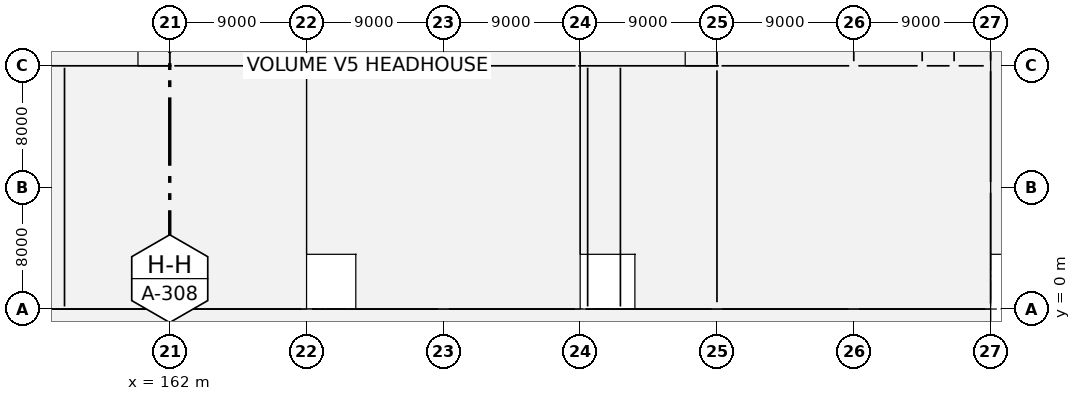
"""IFC4 building model, lengths in metres.
Left out: names, types, materials, properties, quantities, classifications, styles, units other than length and angle.
Written with IfcOpenShell. Run it as: python <this file> out.ifc"""

import sys

from ifc_helpers import new_model, si_unit, direction, frame, frame_2d, origin, origin_2d, place, context, subcontext, project, spatial, rectangle, extrude, element, fill, save


model = new_model("IFC4")
c1 = context("Model", 3, precision=1e-05, world=origin(), true_north=direction((0.0, 1.0)))
c2 = subcontext(c1, "Body", "Model", "MODEL_VIEW")
j1 = project(units=[si_unit("LENGTHUNIT", "METRE"), si_unit("PLANEANGLEUNIT", "RADIAN")], contexts=[c1])
p1 = place(None, origin())
s1 = spatial("IfcSite", under=j1, at=p1, CompositionType="ELEMENT")
p2 = place(p1, origin())
s2 = spatial("IfcBuilding", under=s1, at=p2, CompositionType="ELEMENT")
p3 = place(p2, origin())
s3 = spatial("IfcBuildingStorey", under=s2, at=p3, CompositionType="ELEMENT", Elevation=0.0)
for number, where, z_axis, x_axis in (
    (1, (162.0, 0.0, -0.5), (0.0, 0.0, 1.0), (1.0, 0.0, 0.0)),
    (2, (162.0, 8.0, -0.5), (0.0, 0.0, 1.0), (1.0, 0.0, 0.0)),
    (3, (162.0, 16.0, -0.5), (0.0, 0.0, 1.0), (1.0, 0.0, 0.0)),
    (4, (171.0, 0.0, -0.5), (0.0, 0.0, 1.0), (1.0, 0.0, 0.0)),
    (5, (171.0, 8.0, -0.5), (0.0, 0.0, 1.0), (1.0, 0.0, 0.0)),
    (6, (171.0, 16.0, -0.5), (0.0, 0.0, 1.0), (1.0, 0.0, 0.0)),
    (7, (180.0, 0.0, -0.5), (0.0, 0.0, 1.0), (1.0, 0.0, 0.0)),
    (8, (180.0, 16.0, -0.5), (0.0, 0.0, 1.0), (1.0, 0.0, 0.0)),
    (9, (189.0, 0.0, -0.5), (0.0, 0.0, 1.0), (1.0, 0.0, 0.0)),
    (10, (189.0, 8.0, -0.5), (0.0, 0.0, 1.0), (1.0, 0.0, 0.0)),
    (11, (189.0, 16.0, -0.5), (0.0, 0.0, 1.0), (1.0, 0.0, 0.0)),
    (12, (198.0, 0.0, -0.5), (0.0, 0.0, 1.0), (1.0, 0.0, 0.0)),
    (13, (198.0, 8.0, -0.5), (0.0, 0.0, 1.0), (1.0, 0.0, 0.0)),
    (14, (198.0, 16.0, -0.5), (0.0, 0.0, 1.0), (1.0, 0.0, 0.0)),
    (15, (207.0, 0.0, -0.5), (0.0, 0.0, 1.0), (1.0, 0.0, 0.0)),
    (16, (207.0, 8.0, -0.5), (0.0, 0.0, 1.0), (1.0, 0.0, 0.0)),
    (17, (207.0, 16.0, -0.5), (0.0, 0.0, 1.0), (1.0, 0.0, 0.0)),
    (18, (216.0, 0.0, -0.5), (0.0, 0.0, 1.0), (1.0, 0.0, 0.0)),
    (19, (216.0, 8.0, -0.5), (0.0, 0.0, 1.0), (1.0, 0.0, 0.0)),
    (20, (216.0, 16.0, -0.5), (0.0, 0.0, 1.0), (1.0, 0.0, 0.0)),
):
    element("IfcColumn", number, at=place(p3, frame(where, z_axis=z_axis, x_axis=x_axis)), inside=s3, PredefinedType="COLUMN", context=c2, shape_type="SweptSolid", body=[
        extrude(rectangle(XDim=0.7, YDim=0.7, at=origin_2d()), origin(), (0.0, 0.0, 1.0), 6.8),
    ])
p4 = place(p3, frame((154.8, 0.0, 0.0), z_axis=(0.0, 0.0, 1.0), x_axis=(-1.0, 0.0, 0.0)))
e21 = element("IfcWall", 21, at=p4, inside=s3, PredefinedType="SOLIDWALL", context=c2, shape_type="SweptSolid", body=[
    extrude(rectangle(XDim=1.45, YDim=0.34, at=frame_2d((0.725, 0.0))), origin(), (0.0, 0.0, 1.0), 5.1),
])
p5 = place(p4, frame((0.1, 0.0, 0.0)))
e22 = element("IfcOpeningElement", 22, at=p5, cuts=e21, PredefinedType="OPENING", context=c2, shape_type="SweptSolid", body=[
    extrude(rectangle(XDim=1.2, YDim=2.25, at=frame_2d((0.6, 1.125))), frame((0.0, 0.18, 0.0), z_axis=(0.0, -1.0, 0.0), x_axis=(1.0, 0.0, 0.0)), (0.0, 0.0, 1.0), 0.36),
])
p6 = place(p3, frame((162.35, 0.0, 0.0), z_axis=(0.0, 0.0, 1.0), x_axis=(1.0, 0.0, 0.0)))
e23 = element("IfcWall", 23, at=p6, inside=s3, PredefinedType="SOLIDWALL", context=c2, shape_type="SweptSolid", body=[
    extrude(rectangle(XDim=8.3, YDim=0.3, at=frame_2d((4.15, 0.0))), origin(), (0.0, 0.0, 1.0), 0.45),
])
p7 = place(p3, frame((171.35, 0.0, 0.0), z_axis=(0.0, 0.0, 1.0), x_axis=(1.0, 0.0, 0.0)))
e24 = element("IfcWall", 24, at=p7, inside=s3, PredefinedType="SOLIDWALL", context=c2, shape_type="SweptSolid", body=[
    extrude(rectangle(XDim=8.3, YDim=0.34, at=frame_2d((4.15, 0.0))), origin(), (0.0, 0.0, 1.0), 5.1),
])
p8 = place(p7, frame((2.95, 0.0, 0.0)))
e25 = element("IfcOpeningElement", 25, at=p8, cuts=e24, PredefinedType="OPENING", context=c2, shape_type="SweptSolid", body=[
    extrude(rectangle(XDim=2.4, YDim=3.1, at=frame_2d((1.2, 1.55))), frame((0.0, 0.18, 0.0), z_axis=(0.0, -1.0, 0.0), x_axis=(1.0, 0.0, 0.0)), (0.0, 0.0, 1.0), 0.36),
])
p9 = place(p3, frame((180.35, 0.0, 0.0), z_axis=(0.0, 0.0, 1.0), x_axis=(1.0, 0.0, 0.0)))
e26 = element("IfcWall", 26, at=p9, inside=s3, PredefinedType="SOLIDWALL", context=c2, shape_type="SweptSolid", body=[
    extrude(rectangle(XDim=8.3, YDim=0.3, at=frame_2d((4.15, 0.0))), origin(), (0.0, 0.0, 1.0), 0.45),
])
p10 = place(p3, frame((191.0, 0.0, 0.0), z_axis=(0.0, 0.0, 1.0), x_axis=(-1.0, 0.0, 0.0)))
e27 = element("IfcWall", 27, at=p10, inside=s3, PredefinedType="SOLIDWALL", context=c2, shape_type="SweptSolid", body=[
    extrude(rectangle(XDim=1.65, YDim=0.34, at=frame_2d((0.825, 0.0))), origin(), (0.0, 0.0, 1.0), 5.1),
])
p11 = place(p10, frame((0.1, 0.0, 0.0)))
e28 = element("IfcOpeningElement", 28, at=p11, cuts=e27, PredefinedType="OPENING", context=c2, shape_type="SweptSolid", body=[
    extrude(rectangle(XDim=1.2, YDim=2.25, at=frame_2d((0.6, 1.125))), frame((0.0, 0.18, 0.0), z_axis=(0.0, -1.0, 0.0), x_axis=(1.0, 0.0, 0.0)), (0.0, 0.0, 1.0), 0.36),
])
p12 = place(p3, frame((198.35, 0.0, 0.0), z_axis=(0.0, 0.0, 1.0), x_axis=(1.0, 0.0, 0.0)))
e29 = element("IfcWall", 29, at=p12, inside=s3, PredefinedType="SOLIDWALL", context=c2, shape_type="SweptSolid", body=[
    extrude(rectangle(XDim=8.3, YDim=0.3, at=frame_2d((4.15, 0.0))), origin(), (0.0, 0.0, 1.0), 0.45),
])
p13 = place(p3, frame((207.35, 0.0, 0.0), z_axis=(0.0, 0.0, 1.0), x_axis=(1.0, 0.0, 0.0)))
e30 = element("IfcWall", 30, at=p13, inside=s3, PredefinedType="SOLIDWALL", context=c2, shape_type="SweptSolid", body=[
    extrude(rectangle(XDim=8.3, YDim=0.34, at=frame_2d((4.15, 0.0))), origin(), (0.0, 0.0, 1.0), 5.1),
])
p14 = place(p13, frame((2.95, 0.0, 0.0)))
e31 = element("IfcOpeningElement", 31, at=p14, cuts=e30, PredefinedType="OPENING", context=c2, shape_type="SweptSolid", body=[
    extrude(rectangle(XDim=2.4, YDim=3.1, at=frame_2d((1.2, 1.55))), frame((0.0, 0.18, 0.0), z_axis=(0.0, -1.0, 0.0), x_axis=(1.0, 0.0, 0.0)), (0.0, 0.0, 1.0), 0.36),
])
p15 = place(p3, frame((216.0, 0.35, 0.0), z_axis=(0.0, 0.0, 1.0), x_axis=(0.0, 1.0, 0.0)))
e32 = element("IfcWall", 32, at=p15, inside=s3, PredefinedType="SOLIDWALL", context=c2, shape_type="SweptSolid", body=[
    extrude(rectangle(XDim=7.3, YDim=0.34, at=frame_2d((3.65, 0.0))), origin(), (0.0, 0.0, 1.0), 5.1),
])
p16 = place(p15, frame((2.45, 0.0, 0.0)))
e33 = element("IfcOpeningElement", 33, at=p16, cuts=e32, PredefinedType="OPENING", context=c2, shape_type="SweptSolid", body=[
    extrude(rectangle(XDim=2.4, YDim=3.1, at=frame_2d((1.2, 1.55))), frame((0.0, 0.18, 0.0), z_axis=(0.0, -1.0, 0.0), x_axis=(1.0, 0.0, 0.0)), (0.0, 0.0, 1.0), 0.36),
])
p17 = place(p3, frame((216.0, 8.35, 0.0), z_axis=(0.0, 0.0, 1.0), x_axis=(0.0, 1.0, 0.0)))
e34 = element("IfcWall", 34, at=p17, inside=s3, PredefinedType="SOLIDWALL", context=c2, shape_type="SweptSolid", body=[
    extrude(rectangle(XDim=7.3, YDim=0.34, at=frame_2d((3.65, 0.0))), origin(), (0.0, 0.0, 1.0), 5.1),
])
p18 = place(p17, frame((1.433, 0.0, 0.85)))
e35 = element("IfcOpeningElement", 35, at=p18, cuts=e34, PredefinedType="OPENING", context=c2, shape_type="SweptSolid", body=[
    extrude(rectangle(XDim=2.0, YDim=3.3, at=frame_2d((1.0, 1.65))), frame((0.0, 0.18, 0.0), z_axis=(0.0, -1.0, 0.0), x_axis=(1.0, 0.0, 0.0)), (0.0, 0.0, 1.0), 0.36),
])
p19 = place(p17, frame((3.867, 0.0, 0.85)))
e36 = element("IfcOpeningElement", 36, at=p19, cuts=e34, PredefinedType="OPENING", context=c2, shape_type="SweptSolid", body=[
    extrude(rectangle(XDim=2.0, YDim=3.3, at=frame_2d((1.0, 1.65))), frame((0.0, 0.18, 0.0), z_axis=(0.0, -1.0, 0.0), x_axis=(1.0, 0.0, 0.0)), (0.0, 0.0, 1.0), 0.36),
])
p20 = place(p3, frame((216.0, 16.35, 0.0), z_axis=(0.0, 0.0, 1.0), x_axis=(0.0, 1.0, 0.0)))
e37 = element("IfcWall", 37, at=p20, inside=s3, PredefinedType="SOLIDWALL", context=c2, shape_type="SweptSolid", body=[
    extrude(rectangle(XDim=7.3, YDim=0.34, at=frame_2d((3.65, 0.0))), origin(), (0.0, 0.0, 1.0), 5.1),
])
p21 = place(p20, frame((2.45, 0.0, 0.0)))
e38 = element("IfcOpeningElement", 38, at=p21, cuts=e37, PredefinedType="OPENING", context=c2, shape_type="SweptSolid", body=[
    extrude(rectangle(XDim=2.4, YDim=3.1, at=frame_2d((1.2, 1.55))), frame((0.0, 0.18, 0.0), z_axis=(0.0, -1.0, 0.0), x_axis=(1.0, 0.0, 0.0)), (0.0, 0.0, 1.0), 0.36),
])
p22 = place(p3, frame((162.125, 16.0, -0.5), z_axis=(0.0, 0.0, 1.0), x_axis=(-1.0, 0.0, 0.0)))
e39 = element("IfcWall", 39, at=p22, inside=s3, PredefinedType="SOLIDWALL", context=c2, shape_type="SweptSolid", body=[
    extrude(rectangle(XDim=9.25, YDim=0.25, at=frame_2d((4.625, 0.0))), origin(), (0.0, 0.0, 1.0), 6.8),
])
p23 = place(p22, frame((7.425, 0.0, 0.5)))
e40 = element("IfcOpeningElement", 40, at=p23, cuts=e39, PredefinedType="OPENING", context=c2, shape_type="SweptSolid", body=[
    extrude(rectangle(XDim=1.2, YDim=2.2, at=frame_2d((0.6, 1.1))), frame((0.0, 0.135, 0.0), z_axis=(0.0, -1.0, 0.0), x_axis=(1.0, 0.0, 0.0)), (0.0, 0.0, 1.0), 0.27),
])
p24 = place(p3, frame((162.0, 16.125, -0.5), z_axis=(0.0, 0.0, 1.0), x_axis=(0.0, 1.0, 0.0)))
e41 = element("IfcWall", 41, at=p24, inside=s3, PredefinedType="SOLIDWALL", context=c2, shape_type="SweptSolid", body=[
    extrude(rectangle(XDim=7.75, YDim=0.25, at=frame_2d((3.875, 0.0))), origin(), (0.0, 0.0, 1.0), 6.8),
])
p25 = place(p3, frame((198.125, 16.0, -0.5), z_axis=(0.0, 0.0, 1.0), x_axis=(-1.0, 0.0, 0.0)))
e42 = element("IfcWall", 42, at=p25, inside=s3, PredefinedType="SOLIDWALL", context=c2, shape_type="SweptSolid", body=[
    extrude(rectangle(XDim=9.25, YDim=0.25, at=frame_2d((4.625, 0.0))), origin(), (0.0, 0.0, 1.0), 6.8),
])
p26 = place(p25, frame((7.225, 0.0, 0.5)))
e43 = element("IfcOpeningElement", 43, at=p26, cuts=e42, PredefinedType="OPENING", context=c2, shape_type="SweptSolid", body=[
    extrude(rectangle(XDim=1.2, YDim=2.2, at=frame_2d((0.6, 1.1))), frame((0.0, 0.135, 0.0), z_axis=(0.0, -1.0, 0.0), x_axis=(1.0, 0.0, 0.0)), (0.0, 0.0, 1.0), 0.27),
])
p27 = place(p3, frame((189.0, 16.125, -0.5), z_axis=(0.0, 0.0, 1.0), x_axis=(0.0, 1.0, 0.0)))
e44 = element("IfcWall", 44, at=p27, inside=s3, PredefinedType="SOLIDWALL", context=c2, shape_type="SweptSolid", body=[
    extrude(rectangle(XDim=7.75, YDim=0.25, at=frame_2d((3.875, 0.0))), origin(), (0.0, 0.0, 1.0), 6.8),
])
p28 = place(p27, frame((1.15, 0.0, 0.5)))
e45 = element("IfcOpeningElement", 45, at=p28, cuts=e44, PredefinedType="OPENING", context=c2, shape_type="SweptSolid", body=[
    extrude(rectangle(XDim=1.2, YDim=2.2, at=frame_2d((0.6, 1.1))), frame((0.0, 0.135, 0.0), z_axis=(0.0, -1.0, 0.0), x_axis=(1.0, 0.0, 0.0)), (0.0, 0.0, 1.0), 0.27),
])
p29 = place(p3, frame((198.0, 16.125, -0.5), z_axis=(0.0, 0.0, 1.0), x_axis=(0.0, 1.0, 0.0)))
e46 = element("IfcWall", 46, at=p29, inside=s3, PredefinedType="SOLIDWALL", context=c2, shape_type="SweptSolid", body=[
    extrude(rectangle(XDim=7.75, YDim=0.25, at=frame_2d((3.875, 0.0))), origin(), (0.0, 0.0, 1.0), 6.8),
])
p30 = place(p3, frame((198.0, 0.45, 0.0), z_axis=(0.0, 0.0, 1.0), x_axis=(0.0, 1.0, 0.0)))
e47 = element("IfcWall", 47, at=p30, inside=s3, PredefinedType="PARTITIONING", context=c2, shape_type="SweptSolid", body=[
    extrude(rectangle(XDim=15.25, YDim=0.11, at=frame_2d((7.625, 0.0))), origin(), (0.0, 0.0, 1.0), 5.35),
])
p31 = place(p30, frame((10.89, 0.0, 0.0)))
e48 = element("IfcOpeningElement", 48, at=p31, cuts=e47, PredefinedType="OPENING", context=c2, shape_type="SweptSolid", body=[
    extrude(rectangle(XDim=1.02, YDim=2.18, at=frame_2d((0.51, 1.09))), frame((0.0, 0.065, 0.0), z_axis=(0.0, -1.0, 0.0), x_axis=(1.0, 0.0, 0.0)), (0.0, 0.0, 1.0), 0.13),
])
p32 = place(p3, frame((162.3, 16.0, 0.0), z_axis=(0.0, 0.0, 1.0), x_axis=(1.0, 0.0, 0.0)))
e49 = element("IfcWall", 49, at=p32, inside=s3, PredefinedType="PARTITIONING", context=c2, shape_type="SweptSolid", body=[
    extrude(rectangle(XDim=26.4, YDim=0.14, at=frame_2d((13.2, 0.0))), origin(), (0.0, 0.0, 1.0), 5.25),
])
p33 = place(p32, frame((12.71, 0.0, 0.0)))
e50 = element("IfcOpeningElement", 50, at=p33, cuts=e49, PredefinedType="OPENING", context=c2, shape_type="SweptSolid", body=[
    extrude(rectangle(XDim=0.98, YDim=2.12, at=frame_2d((0.49, 1.06))), frame((0.0, 0.08, 0.0), z_axis=(0.0, -1.0, 0.0), x_axis=(1.0, 0.0, 0.0)), (0.0, 0.0, 1.0), 0.16),
])
p34 = place(p3, frame((198.3, 16.0, 0.0), z_axis=(0.0, 0.0, 1.0), x_axis=(1.0, 0.0, 0.0)))
e51 = element("IfcWall", 51, at=p34, inside=s3, PredefinedType="PARTITIONING", context=c2, shape_type="SweptSolid", body=[
    extrude(rectangle(XDim=8.4, YDim=0.135, at=frame_2d((4.2, 0.0))), origin(), (0.0, 0.0, 1.0), 5.25),
])
p35 = place(p3, frame((207.3, 16.0, 0.0), z_axis=(0.0, 0.0, 1.0), x_axis=(1.0, 0.0, 0.0)))
e52 = element("IfcWall", 52, at=p35, inside=s3, PredefinedType="PARTITIONING", context=c2, shape_type="SweptSolid", body=[
    extrude(rectangle(XDim=3.9, YDim=0.15, at=frame_2d((1.95, 0.0))), origin(), (0.0, 0.0, 1.0), 5.25),
])
p36 = place(p3, frame((211.8, 16.0, 0.0), z_axis=(0.0, 0.0, 1.0), x_axis=(1.0, 0.0, 0.0)))
e53 = element("IfcWall", 53, at=p36, inside=s3, PredefinedType="PARTITIONING", context=c2, shape_type="SweptSolid", body=[
    extrude(rectangle(XDim=1.5, YDim=0.135, at=frame_2d((0.75, 0.0))), origin(), (0.0, 0.0, 1.0), 5.25),
])
p37 = place(p3, frame((213.9, 16.0, 0.0), z_axis=(0.0, 0.0, 1.0), x_axis=(1.0, 0.0, 0.0)))
e54 = element("IfcWall", 54, at=p37, inside=s3, PredefinedType="PARTITIONING", context=c2, shape_type="SweptSolid", body=[
    extrude(rectangle(XDim=1.65, YDim=0.14, at=frame_2d((0.825, 0.0))), origin(), (0.0, 0.0, 1.0), 5.25),
])
p38 = place(p3, frame((207.0, 16.3, 0.0), z_axis=(0.0, 0.0, 1.0), x_axis=(0.0, 1.0, 0.0)))
e55 = element("IfcWall", 55, at=p38, inside=s3, PredefinedType="PARTITIONING", context=c2, shape_type="SweptSolid", body=[
    extrude(rectangle(XDim=7.4, YDim=0.15, at=frame_2d((3.7, 0.0))), origin(), (0.0, 0.0, 1.0), 5.35),
])
p39 = place(p3, frame((211.5, 16.3, 0.0), z_axis=(0.0, 0.0, 1.0), x_axis=(0.0, 1.0, 0.0)))
e56 = element("IfcWall", 56, at=p39, inside=s3, PredefinedType="PARTITIONING", context=c2, shape_type="SweptSolid", body=[
    extrude(rectangle(XDim=7.7, YDim=0.135, at=frame_2d((3.85, 0.0))), origin(), (0.0, 0.0, 1.0), 5.95),
])
p40 = place(p3, frame((213.6, 16.3, 0.0), z_axis=(0.0, 0.0, 1.0), x_axis=(0.0, 1.0, 0.0)))
e57 = element("IfcWall", 57, at=p40, inside=s3, PredefinedType="PARTITIONING", context=c2, shape_type="SweptSolid", body=[
    extrude(rectangle(XDim=7.7, YDim=0.15, at=frame_2d((3.85, 0.0))), origin(), (0.0, 0.0, 1.0), 5.95),
])
p41 = place(p3, frame((155.077, 0.17, 0.0), z_axis=(0.0, 0.0, 1.0), x_axis=(0.0, 1.0, 0.0)))
e58 = element("IfcWall", 58, at=p41, inside=s3, PredefinedType="STANDARD", context=c2, shape_type="SweptSolid", body=[
    extrude(rectangle(XDim=15.705, YDim=0.255, at=frame_2d((7.853, 0.0))), origin(), (0.0, 0.0, 1.0), 5.95),
])
p42 = place(p3, frame((154.8, 0.0, 0.0), z_axis=(0.0, 0.0, 1.0), x_axis=(1.0, 0.0, 0.0)))
e59 = element("IfcWall", 59, at=p42, inside=s3, PredefinedType="SOLIDWALL", context=c2, shape_type="SweptSolid", body=[
    extrude(rectangle(XDim=6.85, YDim=0.34, at=frame_2d((3.425, 0.0))), origin(), (0.0, 0.0, 1.0), 5.1),
])
p43 = place(p42, frame((1.5, 0.0, 0.0)))
e60 = element("IfcOpeningElement", 60, at=p43, cuts=e59, PredefinedType="OPENING", context=c2, shape_type="SweptSolid", body=[
    extrude(rectangle(XDim=2.4, YDim=3.1, at=frame_2d((1.2, 1.55))), frame((0.0, 0.18, 0.0), z_axis=(0.0, -1.0, 0.0), x_axis=(1.0, 0.0, 0.0)), (0.0, 0.0, 1.0), 0.36),
])
for number, where, z_axis, x_axis in (
    (61, (189.492, 0.17, 0.0), (0.0, 0.0, 1.0), (0.0, 1.0, 0.0)),
    (62, (191.647, 0.17, 0.0), (0.0, 0.0, 1.0), (0.0, 1.0, 0.0)),
):
    element("IfcWall", number, at=place(p3, frame(where, z_axis=z_axis, x_axis=x_axis)), inside=s3, PredefinedType="STANDARD", context=c2, shape_type="SweptSolid", body=[
        extrude(rectangle(XDim=15.705, YDim=0.255, at=frame_2d((7.853, 0.0))), origin(), (0.0, 0.0, 1.0), 5.95),
    ])
p44 = place(p3, frame((191.0, 0.0, 0.0), z_axis=(0.0, 0.0, 1.0), x_axis=(1.0, 0.0, 0.0)))
e63 = element("IfcWall", 63, at=p44, inside=s3, PredefinedType="SOLIDWALL", context=c2, shape_type="SweptSolid", body=[
    extrude(rectangle(XDim=6.65, YDim=0.34, at=frame_2d((3.325, 0.0))), origin(), (0.0, 0.0, 1.0), 5.1),
])
p45 = place(p44, frame((1.3, 0.0, 0.0)))
e64 = element("IfcOpeningElement", 64, at=p45, cuts=e63, PredefinedType="OPENING", context=c2, shape_type="SweptSolid", body=[
    extrude(rectangle(XDim=2.4, YDim=3.1, at=frame_2d((1.2, 1.55))), frame((0.0, 0.18, 0.0), z_axis=(0.0, -1.0, 0.0), x_axis=(1.0, 0.0, 0.0)), (0.0, 0.0, 1.0), 0.36),
])
p46 = place(p43, origin())
e65 = element("IfcDoor", 65, at=p46, inside=s3, OperationType="DOUBLE_DOOR_SINGLE_SWING", PredefinedType="DOOR", context=c2, shape_type="SweptSolid", body=[
    extrude(rectangle(XDim=2.4, YDim=3.1, at=frame_2d((1.2, 1.55))), frame((0.0, 0.025, 0.0), z_axis=(0.0, -1.0, 0.0), x_axis=(1.0, 0.0, 0.0)), (0.0, 0.0, 1.0), 0.05),
])
fill(e60, e65)
p47 = place(p8, origin())
e66 = element("IfcDoor", 66, at=p47, inside=s3, OperationType="DOUBLE_DOOR_SINGLE_SWING", PredefinedType="DOOR", context=c2, shape_type="SweptSolid", body=[
    extrude(rectangle(XDim=2.4, YDim=3.1, at=frame_2d((1.2, 1.55))), frame((0.0, 0.025, 0.0), z_axis=(0.0, -1.0, 0.0), x_axis=(1.0, 0.0, 0.0)), (0.0, 0.0, 1.0), 0.05),
])
fill(e25, e66)
p48 = place(p45, origin())
e67 = element("IfcDoor", 67, at=p48, inside=s3, OperationType="DOUBLE_DOOR_SINGLE_SWING", PredefinedType="DOOR", context=c2, shape_type="SweptSolid", body=[
    extrude(rectangle(XDim=2.4, YDim=3.1, at=frame_2d((1.2, 1.55))), frame((0.0, 0.025, 0.0), z_axis=(0.0, -1.0, 0.0), x_axis=(1.0, 0.0, 0.0)), (0.0, 0.0, 1.0), 0.05),
])
fill(e64, e67)
p49 = place(p14, origin())
e68 = element("IfcDoor", 68, at=p49, inside=s3, OperationType="DOUBLE_DOOR_SINGLE_SWING", PredefinedType="DOOR", context=c2, shape_type="SweptSolid", body=[
    extrude(rectangle(XDim=2.4, YDim=3.1, at=frame_2d((1.2, 1.55))), frame((0.0, 0.025, 0.0), z_axis=(0.0, -1.0, 0.0), x_axis=(1.0, 0.0, 0.0)), (0.0, 0.0, 1.0), 0.05),
])
fill(e31, e68)
p50 = place(p16, origin())
e69 = element("IfcDoor", 69, at=p50, inside=s3, OperationType="DOUBLE_DOOR_SINGLE_SWING", PredefinedType="DOOR", context=c2, shape_type="SweptSolid", body=[
    extrude(rectangle(XDim=2.4, YDim=3.1, at=frame_2d((1.2, 1.55))), frame((0.0, 0.025, 0.0), z_axis=(0.0, -1.0, 0.0), x_axis=(1.0, 0.0, 0.0)), (0.0, 0.0, 1.0), 0.05),
])
fill(e33, e69)
p51 = place(p18, origin())
e70 = element("IfcWindow", 70, at=p51, inside=s3, PartitioningType="DOUBLE_PANEL_VERTICAL", PredefinedType="WINDOW", context=c2, shape_type="SweptSolid", body=[
    extrude(rectangle(XDim=2.0, YDim=3.3, at=frame_2d((1.0, 1.65))), frame((0.0, 0.03, 0.0), z_axis=(0.0, -1.0, 0.0), x_axis=(1.0, 0.0, 0.0)), (0.0, 0.0, 1.0), 0.06),
])
fill(e35, e70)
p52 = place(p19, origin())
e71 = element("IfcWindow", 71, at=p52, inside=s3, PartitioningType="DOUBLE_PANEL_VERTICAL", PredefinedType="WINDOW", context=c2, shape_type="SweptSolid", body=[
    extrude(rectangle(XDim=2.0, YDim=3.3, at=frame_2d((1.0, 1.65))), frame((0.0, 0.03, 0.0), z_axis=(0.0, -1.0, 0.0), x_axis=(1.0, 0.0, 0.0)), (0.0, 0.0, 1.0), 0.06),
])
fill(e36, e71)
p53 = place(p31, origin())
e72 = element("IfcDoor", 72, at=p53, inside=s3, OperationType="SINGLE_SWING_LEFT", PredefinedType="DOOR", context=c2, shape_type="SweptSolid", body=[
    extrude(rectangle(XDim=1.02, YDim=2.18, at=frame_2d((0.51, 1.09))), frame((0.0, 0.025, 0.0), z_axis=(0.0, -1.0, 0.0), x_axis=(1.0, 0.0, 0.0)), (0.0, 0.0, 1.0), 0.05),
])
fill(e48, e72)
p54 = place(p33, origin())
e73 = element("IfcDoor", 73, at=p54, inside=s3, OperationType="SINGLE_SWING_RIGHT", PredefinedType="DOOR", context=c2, shape_type="SweptSolid", body=[
    extrude(rectangle(XDim=0.98, YDim=2.12, at=frame_2d((0.49, 1.06))), frame((0.0, 0.025, 0.0), z_axis=(0.0, -1.0, 0.0), x_axis=(1.0, 0.0, 0.0)), (0.0, 0.0, 1.0), 0.05),
])
fill(e50, e73)
p55 = place(p23, origin())
e74 = element("IfcDoor", 74, at=p55, inside=s3, OperationType="SINGLE_SWING_RIGHT", PredefinedType="DOOR", context=c2, shape_type="SweptSolid", body=[
    extrude(rectangle(XDim=1.2, YDim=2.2, at=frame_2d((0.6, 1.1))), frame((0.0, 0.025, 0.0), z_axis=(0.0, -1.0, 0.0), x_axis=(1.0, 0.0, 0.0)), (0.0, 0.0, 1.0), 0.05),
])
fill(e40, e74)
p56 = place(p5, origin())
e75 = element("IfcDoor", 75, at=p56, inside=s3, OperationType="SINGLE_SWING_LEFT", PredefinedType="DOOR", context=c2, shape_type="SweptSolid", body=[
    extrude(rectangle(XDim=1.2, YDim=2.25, at=frame_2d((0.6, 1.125))), frame((0.0, 0.025, 0.0), z_axis=(0.0, -1.0, 0.0), x_axis=(1.0, 0.0, 0.0)), (0.0, 0.0, 1.0), 0.05),
])
fill(e22, e75)
p57 = place(p26, origin())
e76 = element("IfcDoor", 76, at=p57, inside=s3, OperationType="SINGLE_SWING_LEFT", PredefinedType="DOOR", context=c2, shape_type="SweptSolid", body=[
    extrude(rectangle(XDim=1.2, YDim=2.2, at=frame_2d((0.6, 1.1))), frame((0.0, 0.025, 0.0), z_axis=(0.0, -1.0, 0.0), x_axis=(1.0, 0.0, 0.0)), (0.0, 0.0, 1.0), 0.05),
])
fill(e43, e76)
p58 = place(p11, origin())
e77 = element("IfcDoor", 77, at=p58, inside=s3, OperationType="SINGLE_SWING_LEFT", PredefinedType="DOOR", context=c2, shape_type="SweptSolid", body=[
    extrude(rectangle(XDim=1.2, YDim=2.25, at=frame_2d((0.6, 1.125))), frame((0.0, 0.025, 0.0), z_axis=(0.0, -1.0, 0.0), x_axis=(1.0, 0.0, 0.0)), (0.0, 0.0, 1.0), 0.05),
])
fill(e28, e77)
save(model, sys.argv[1])
